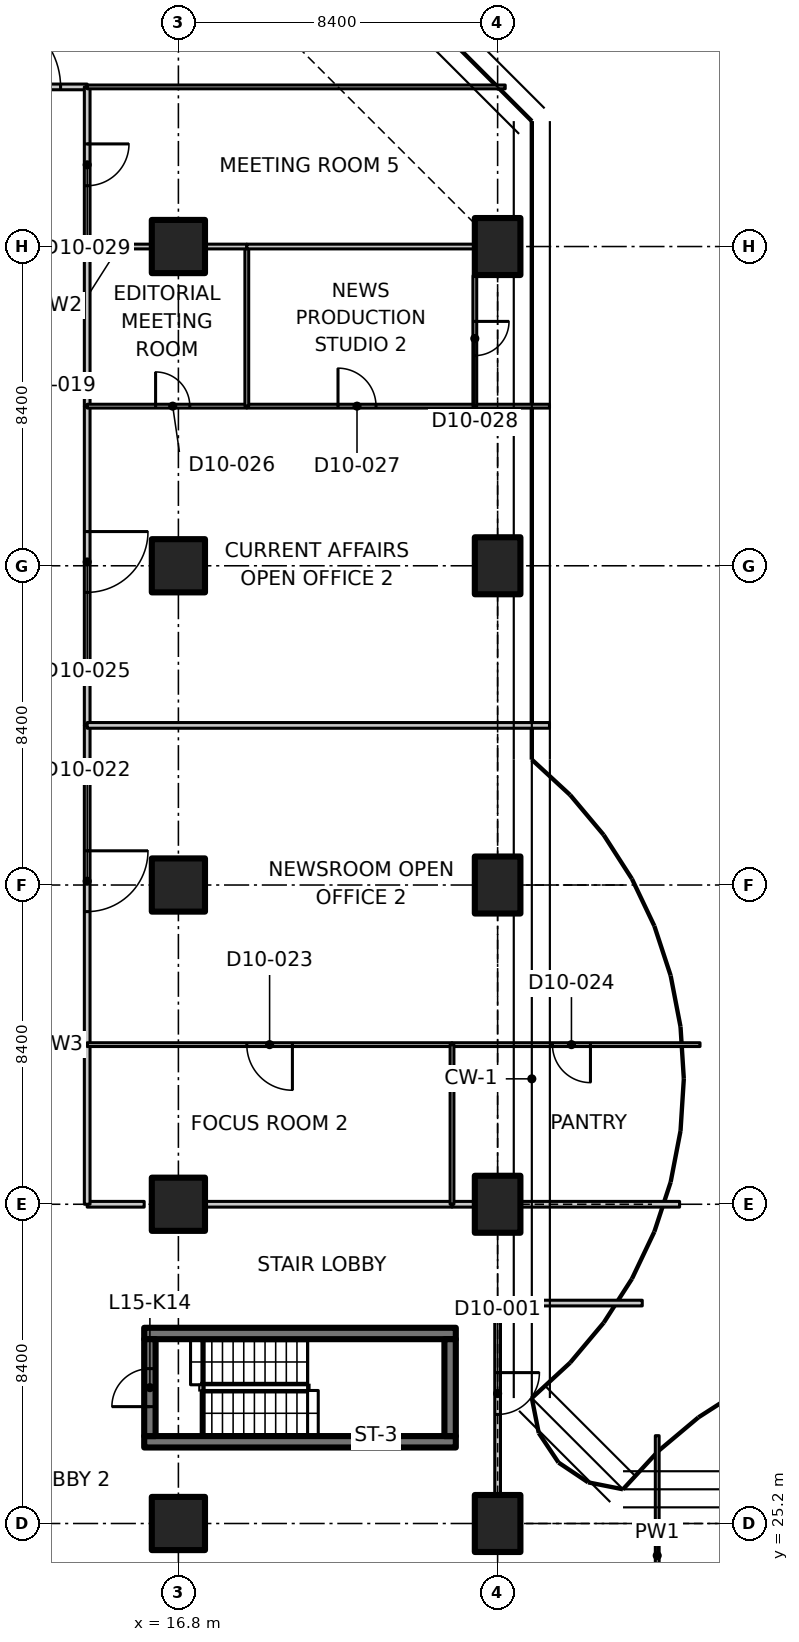
"""IFC4 building model, lengths in metres.
Left out: names, types, materials, properties, quantities, classifications, styles, units other than length and angle.
Written with IfcOpenShell. Run it as: python <this file> out.ifc"""

import sys

from ifc_helpers import new_model, si_unit, direction, frame, frame_2d, origin, origin_2d, place, context, subcontext, project, spatial, polyline, rectangle, outline, extrude, element, fill, save


model = new_model("IFC4")
c1 = context("Model", 3, precision=1e-05, world=origin(), true_north=direction((0.0, 1.0)))
c2 = subcontext(c1, "Body", "Model", "MODEL_VIEW")
j1 = project(units=[si_unit("LENGTHUNIT", "METRE"), si_unit("PLANEANGLEUNIT", "RADIAN")], contexts=[c1])
p1 = place(None, origin())
s1 = spatial("IfcSite", under=j1, at=p1, CompositionType="ELEMENT")
p2 = place(p1, origin())
s2 = spatial("IfcBuilding", under=s1, at=p2, CompositionType="ELEMENT")
p3 = place(p2, frame((0.0, 0.0, 68.9)))
s3 = spatial("IfcBuildingStorey", under=s2, at=p3, CompositionType="ELEMENT", Elevation=68.9)
for number, where, z_axis, x_axis in (
    (1, (16.8, 25.2, 0.0), (0.0, 0.0, 1.0), (1.0, 0.0, 0.0)),
    (2, (16.8, 33.6, 0.0), (0.0, 0.0, 1.0), (1.0, 0.0, 0.0)),
    (3, (16.8, 42.0, 0.0), (0.0, 0.0, 1.0), (1.0, 0.0, 0.0)),
    (4, (16.8, 50.4, 0.0), (0.0, 0.0, 1.0), (1.0, 0.0, 0.0)),
    (5, (16.8, 58.8, 0.0), (0.0, 0.0, 1.0), (1.0, 0.0, 0.0)),
):
    element("IfcColumn", number, at=place(p3, frame(where, z_axis=z_axis, x_axis=x_axis)), inside=s3, PredefinedType="COLUMN", context=c2, shape_type="SweptSolid", body=[
        extrude(rectangle(XDim=1.4, YDim=1.4, at=origin_2d()), origin(), (0.0, 0.0, 1.0), 3.35),
    ])
for number, where, z_axis, x_axis in (
    (6, (25.2, 25.2, 0.0), (0.0, 0.0, 1.0), (1.0, 0.0, 0.0)),
    (7, (25.2, 33.6, 0.0), (0.0, 0.0, 1.0), (1.0, 0.0, 0.0)),
    (8, (25.2, 42.0, 0.0), (0.0, 0.0, 1.0), (1.0, 0.0, 0.0)),
    (9, (25.2, 50.4, 0.0), (0.0, 0.0, 1.0), (1.0, 0.0, 0.0)),
    (10, (25.2, 58.8, 0.0), (0.0, 0.0, 1.0), (1.0, 0.0, 0.0)),
):
    element("IfcColumn", number, at=place(p3, frame(where, z_axis=z_axis, x_axis=x_axis)), inside=s3, PredefinedType="COLUMN", context=c2, shape_type="SweptSolid", body=[
        extrude(rectangle(XDim=1.2, YDim=1.5, at=origin_2d()), origin(), (0.0, 0.0, 1.0), 3.35),
    ])
for number, where, z_axis, x_axis in (
    (11, (15.9, 27.35, 0.0), (0.0, 0.0, 1.0), (1.0, 0.0, 0.0)),
    (12, (15.9, 30.2, 0.0), (0.0, 0.0, 1.0), (1.0, 0.0, 0.0)),
):
    element("IfcWall", number, at=place(p3, frame(where, z_axis=z_axis, x_axis=x_axis)), inside=s3, PredefinedType="SHEAR", context=c2, shape_type="SweptSolid", body=[
        extrude(rectangle(XDim=8.2, YDim=0.3, at=frame_2d((4.1, 0.0))), origin(), (0.0, 0.0, 1.0), 3.35),
    ])
p4 = place(p3, frame((16.05, 27.5, 0.0), z_axis=(0.0, 0.0, 1.0), x_axis=(0.0, 1.0, 0.0)))
e13 = element("IfcWall", 13, at=p4, inside=s3, PredefinedType="SHEAR", context=c2, shape_type="SweptSolid", body=[
    extrude(rectangle(XDim=2.55, YDim=0.3, at=frame_2d((1.275, 0.0))), origin(), (0.0, 0.0, 1.0), 3.35),
])
p5 = place(p4, frame((0.775, 0.0, 0.0)))
e14 = element("IfcOpeningElement", 14, at=p5, cuts=e13, PredefinedType="OPENING", context=c2, shape_type="SweptSolid", body=[
    extrude(rectangle(XDim=1.0, YDim=2.1, at=frame_2d((0.5, 1.05))), frame((0.0, 0.16, 0.0), z_axis=(0.0, -1.0, 0.0), x_axis=(1.0, 0.0, 0.0)), (0.0, 0.0, 1.0), 0.32),
])
p6 = place(p3, frame((23.95, 27.5, 0.0), z_axis=(0.0, 0.0, 1.0), x_axis=(0.0, 1.0, 0.0)))
e15 = element("IfcWall", 15, at=p6, inside=s3, PredefinedType="SHEAR", context=c2, shape_type="SweptSolid", body=[
    extrude(rectangle(XDim=2.55, YDim=0.3, at=frame_2d((1.275, 0.0))), origin(), (0.0, 0.0, 1.0), 3.35),
])
p7 = place(p3, frame((29.4, 27.511, 0.0), z_axis=(0.0, 0.0, 1.0), x_axis=(0.0, -1.0, 0.0)))
e16 = element("IfcWall", 16, at=p7, inside=s3, PredefinedType="PARTITIONING", context=c2, shape_type="SweptSolid", body=[
    extrude(outline(polyline([(0.0, 0.0), (6.311, 0.0), (6.311, 3.33), (2.761, 3.33), (2.759, 2.98), (1.863, 2.98), (1.861, 3.33), (0.236, 3.33), (0.0, 3.33), (0.0, 0.0)])), frame((0.0, 0.05, 0.0), z_axis=(0.0, -1.0, 0.0), x_axis=(1.0, 0.0, 0.0)), (0.0, 0.0, 1.0), 0.1),
])
p8 = place(p3, frame((25.2, 31.0, 0.0), z_axis=(0.0, 0.0, 1.0), x_axis=(0.0, -1.0, 0.0)))
e17 = element("IfcWall", 17, at=p8, inside=s3, PredefinedType="PARTITIONING", context=c2, shape_type="SweptSolid", body=[
    extrude(outline(polyline([(0.0, 0.0), (5.03, 0.0), (5.03, 2.98), (0.0, 2.98), (0.0, 0.0)])), frame((0.0, 0.075, 0.0), z_axis=(0.0, -1.0, 0.0), x_axis=(1.0, 0.0, 0.0)), (0.0, 0.0, 1.0), 0.15),
])
p9 = place(p8, frame((1.83, 0.0, 0.0)))
e18 = element("IfcOpeningElement", 18, at=p9, cuts=e17, PredefinedType="OPENING", context=c2, shape_type="SweptSolid", body=[
    extrude(rectangle(XDim=1.1, YDim=2.1, at=frame_2d((0.55, 1.05))), frame((0.0, 0.085, 0.0), z_axis=(0.0, -1.0, 0.0), x_axis=(1.0, 0.0, 0.0)), (0.0, 0.0, 1.0), 0.17),
])
p10 = place(p3, frame((25.2, 31.0, 0.0), z_axis=(0.0, 0.0, 1.0), x_axis=(1.0, 0.0, 0.0)))
e19 = element("IfcWall", 19, at=p10, inside=s3, PredefinedType="PARTITIONING", context=c2, shape_type="SweptSolid", body=[
    extrude(rectangle(XDim=3.806, YDim=0.15, at=frame_2d((1.903, 0.0))), origin(), (0.0, 0.0, 1.0), 2.98),
])
p11 = place(p3, frame((14.4, 33.6, 0.0), z_axis=(0.0, 0.0, 1.0), x_axis=(1.0, 0.0, 0.0)))
e20 = element("IfcWall", 20, at=p11, inside=s3, PredefinedType="PARTITIONING", context=c2, shape_type="SweptSolid", body=[
    extrude(rectangle(XDim=1.5, YDim=0.15, at=frame_2d((0.75, 0.0))), origin(), (0.0, 0.0, 1.0), 3.33),
])
p12 = place(p3, frame((17.52, 33.6, 0.0), z_axis=(0.0, 0.0, 1.0), x_axis=(1.0, 0.0, 0.0)))
e21 = element("IfcWall", 21, at=p12, inside=s3, PredefinedType="PARTITIONING", context=c2, shape_type="SweptSolid", body=[
    extrude(rectangle(XDim=6.48, YDim=0.15, at=frame_2d((3.24, 0.0))), origin(), (0.0, 0.0, 1.0), 3.33),
])
p13 = place(p3, frame((24.0, 33.6, 0.0), z_axis=(0.0, 0.0, 1.0), x_axis=(1.0, 0.0, 0.0)))
e22 = element("IfcWall", 22, at=p13, inside=s3, PredefinedType="PARTITIONING", context=c2, shape_type="SweptSolid", body=[
    extrude(rectangle(XDim=0.58, YDim=0.15, at=frame_2d((0.29, 0.0))), origin(), (0.0, 0.0, 1.0), 3.33),
])
p14 = place(p3, frame((25.82, 33.6, 0.0), z_axis=(0.0, 0.0, 1.0), x_axis=(1.0, 0.0, 0.0)))
e23 = element("IfcWall", 23, at=p14, inside=s3, PredefinedType="PARTITIONING", context=c2, shape_type="SweptSolid", body=[
    extrude(rectangle(XDim=4.168, YDim=0.15, at=frame_2d((2.084, 0.0))), origin(), (0.0, 0.0, 1.0), 2.98),
])
p15 = place(p3, frame((10.8, 63.0, 0.0), z_axis=(0.0, 0.0, 1.0), x_axis=(1.0, 0.0, 0.0)))
e24 = element("IfcWall", 24, at=p15, inside=s3, PredefinedType="PARTITIONING", context=c2, shape_type="SweptSolid", body=[
    extrude(rectangle(XDim=3.6, YDim=0.15, at=frame_2d((1.8, 0.0))), origin(), (0.0, 0.0, 1.0), 3.33),
])
p16 = place(p15, frame((0.9, 0.0, 0.0)))
e25 = element("IfcOpeningElement", 25, at=p16, cuts=e24, PredefinedType="OPENING", context=c2, shape_type="SweptSolid", body=[
    extrude(rectangle(XDim=2.0, YDim=2.4, at=frame_2d((1.0, 1.2))), frame((0.0, 0.085, 0.0), z_axis=(0.0, -1.0, 0.0), x_axis=(1.0, 0.0, 0.0)), (0.0, 0.0, 1.0), 0.17),
])
p17 = place(p3, frame((14.4, 46.2, 0.0), z_axis=(0.0, 0.0, 1.0), x_axis=(0.0, -1.0, 0.0)))
e26 = element("IfcWall", 26, at=p17, inside=s3, PredefinedType="PARTITIONING", context=c2, shape_type="SweptSolid", body=[
    extrude(rectangle(XDim=8.4, YDim=0.15, at=frame_2d((4.2, 0.0))), origin(), (0.0, 0.0, 1.0), 3.33),
])
p18 = place(p17, frame((3.3, 0.0, 0.0)))
e27 = element("IfcOpeningElement", 27, at=p18, cuts=e26, PredefinedType="OPENING", context=c2, shape_type="SweptSolid", body=[
    extrude(rectangle(XDim=1.6, YDim=2.1, at=frame_2d((0.8, 1.05))), frame((0.0, 0.085, 0.0), z_axis=(0.0, -1.0, 0.0), x_axis=(1.0, 0.0, 0.0)), (0.0, 0.0, 1.0), 0.17),
])
p19 = place(p3, frame((14.4, 37.8, 0.0), z_axis=(0.0, 0.0, 1.0), x_axis=(0.0, -1.0, 0.0)))
e28 = element("IfcWall", 28, at=p19, inside=s3, PredefinedType="PARTITIONING", context=c2, shape_type="SweptSolid", body=[
    extrude(rectangle(XDim=4.2, YDim=0.15, at=frame_2d((2.1, 0.0))), origin(), (0.0, 0.0, 1.0), 3.33),
])
p20 = place(p3, frame((14.4, 54.6, 0.0), z_axis=(0.0, 0.0, 1.0), x_axis=(0.0, -1.0, 0.0)))
e29 = element("IfcWall", 29, at=p20, inside=s3, PredefinedType="PARTITIONING", context=c2, shape_type="SweptSolid", body=[
    extrude(rectangle(XDim=8.4, YDim=0.15, at=frame_2d((4.2, 0.0))), origin(), (0.0, 0.0, 1.0), 3.33),
])
p21 = place(p20, frame((3.3, 0.0, 0.0)))
e30 = element("IfcOpeningElement", 30, at=p21, cuts=e29, PredefinedType="OPENING", context=c2, shape_type="SweptSolid", body=[
    extrude(rectangle(XDim=1.6, YDim=2.1, at=frame_2d((0.8, 1.05))), frame((0.0, 0.085, 0.0), z_axis=(0.0, -1.0, 0.0), x_axis=(1.0, 0.0, 0.0)), (0.0, 0.0, 1.0), 0.17),
])
p22 = place(p3, frame((14.4, 58.8, 0.0), z_axis=(0.0, 0.0, 1.0), x_axis=(0.0, -1.0, 0.0)))
e31 = element("IfcWall", 31, at=p22, inside=s3, PredefinedType="PARTITIONING", context=c2, shape_type="SweptSolid", body=[
    extrude(rectangle(XDim=4.2, YDim=0.15, at=frame_2d((2.1, 0.0))), origin(), (0.0, 0.0, 1.0), 3.33),
])
p23 = place(p3, frame((14.4, 63.0, 0.0), z_axis=(0.0, 0.0, 1.0), x_axis=(0.0, -1.0, 0.0)))
e32 = element("IfcWall", 32, at=p23, inside=s3, PredefinedType="PARTITIONING", context=c2, shape_type="SweptSolid", body=[
    extrude(rectangle(XDim=4.2, YDim=0.15, at=frame_2d((2.1, 0.0))), origin(), (0.0, 0.0, 1.0), 3.33),
])
p24 = place(p23, frame((1.5, 0.0, 0.0)))
e33 = element("IfcOpeningElement", 33, at=p24, cuts=e32, PredefinedType="OPENING", context=c2, shape_type="SweptSolid", body=[
    extrude(rectangle(XDim=1.1, YDim=2.1, at=frame_2d((0.55, 1.05))), frame((0.0, 0.085, 0.0), z_axis=(0.0, -1.0, 0.0), x_axis=(1.0, 0.0, 0.0)), (0.0, 0.0, 1.0), 0.17),
])
p25 = place(p3, frame((25.4, 63.0, 0.0), z_axis=(0.0, 0.0, 1.0), x_axis=(-1.0, 0.0, 0.0)))
e34 = element("IfcWall", 34, at=p25, inside=s3, PredefinedType="PARTITIONING", context=c2, shape_type="SweptSolid", body=[
    extrude(outline(polyline([(0.0, 0.0), (11.0, 0.0), (11.0, 3.33), (5.066, 3.33), (5.064, 2.98), (3.736, 2.98), (3.734, 3.33), (0.0, 3.33), (0.0, 0.0)])), frame((0.0, 0.05, 0.0), z_axis=(0.0, -1.0, 0.0), x_axis=(1.0, 0.0, 0.0)), (0.0, 0.0, 1.0), 0.1),
])
p26 = place(p3, frame((24.0, 37.8, 0.0), z_axis=(0.0, 0.0, 1.0), x_axis=(-1.0, 0.0, 0.0)))
e35 = element("IfcWall", 35, at=p26, inside=s3, PredefinedType="PARTITIONING", context=c2, shape_type="SweptSolid", body=[
    extrude(rectangle(XDim=9.6, YDim=0.1, at=frame_2d((4.8, 0.0))), origin(), (0.0, 0.0, 1.0), 3.33),
])
p27 = place(p26, frame((4.2, 0.0, 0.0)))
e36 = element("IfcOpeningElement", 36, at=p27, cuts=e35, PredefinedType="OPENING", context=c2, shape_type="SweptSolid", body=[
    extrude(rectangle(XDim=1.2, YDim=2.1, at=frame_2d((0.6, 1.05))), frame((0.0, 0.06, 0.0), z_axis=(0.0, -1.0, 0.0), x_axis=(1.0, 0.0, 0.0)), (0.0, 0.0, 1.0), 0.12),
])
p28 = place(p3, frame((30.526, 37.8, 0.0), z_axis=(0.0, 0.0, 1.0), x_axis=(-1.0, 0.0, 0.0)))
e37 = element("IfcWall", 37, at=p28, inside=s3, PredefinedType="PARTITIONING", context=c2, shape_type="SweptSolid", body=[
    extrude(outline(polyline([(0.0, 0.0), (6.526, 0.0), (6.526, 3.33), (5.776, 3.33), (5.774, 2.98), (4.878, 2.98), (4.876, 3.33), (0.283, 3.33), (0.0, 3.33), (0.0, 0.0)])), frame((0.0, 0.05, 0.0), z_axis=(0.0, -1.0, 0.0), x_axis=(1.0, 0.0, 0.0)), (0.0, 0.0, 1.0), 0.1),
])
p29 = place(p28, frame((2.883, 0.0, 0.0)))
e38 = element("IfcOpeningElement", 38, at=p29, cuts=e37, PredefinedType="OPENING", context=c2, shape_type="SweptSolid", body=[
    extrude(rectangle(XDim=1.0, YDim=2.1, at=frame_2d((0.5, 1.05))), frame((0.0, 0.06, 0.0), z_axis=(0.0, -1.0, 0.0), x_axis=(1.0, 0.0, 0.0)), (0.0, 0.0, 1.0), 0.12),
])
p30 = place(p3, frame((14.4, 46.2, 0.0), z_axis=(0.0, 0.0, 1.0), x_axis=(1.0, 0.0, 0.0)))
e39 = element("IfcWall", 39, at=p30, inside=s3, PredefinedType="PARTITIONING", context=c2, shape_type="SweptSolid", body=[
    extrude(outline(polyline([(0.0, 0.0), (12.165, 0.0), (12.165, 3.33), (11.9, 3.33), (11.25, 3.33), (11.248, 2.98), (10.352, 2.98), (10.35, 3.33), (0.0, 3.33), (0.0, 0.0)])), frame((0.0, 0.075, 0.0), z_axis=(0.0, -1.0, 0.0), x_axis=(1.0, 0.0, 0.0)), (0.0, 0.0, 1.0), 0.15),
])
p31 = place(p3, frame((24.0, 37.8, 0.0), z_axis=(0.0, 0.0, 1.0), x_axis=(0.0, -1.0, 0.0)))
e40 = element("IfcWall", 40, at=p31, inside=s3, PredefinedType="PARTITIONING", context=c2, shape_type="SweptSolid", body=[
    extrude(rectangle(XDim=4.2, YDim=0.1, at=frame_2d((2.1, 0.0))), origin(), (0.0, 0.0, 1.0), 3.33),
])
p32 = place(p3, frame((14.4, 54.6, 0.0), z_axis=(0.0, 0.0, 1.0), x_axis=(1.0, 0.0, 0.0)))
e41 = element("IfcWall", 41, at=p32, inside=s3, PredefinedType="PARTITIONING", context=c2, shape_type="SweptSolid", body=[
    extrude(rectangle(XDim=4.2, YDim=0.1, at=frame_2d((2.1, 0.0))), origin(), (0.0, 0.0, 1.0), 3.33),
])
p33 = place(p32, frame((1.8, 0.0, 0.0)))
e42 = element("IfcOpeningElement", 42, at=p33, cuts=e41, PredefinedType="OPENING", context=c2, shape_type="SweptSolid", body=[
    extrude(rectangle(XDim=0.9, YDim=2.1, at=frame_2d((0.45, 1.05))), frame((0.0, 0.06, 0.0), z_axis=(0.0, -1.0, 0.0), x_axis=(1.0, 0.0, 0.0)), (0.0, 0.0, 1.0), 0.12),
])
p34 = place(p3, frame((18.6, 54.6, 0.0), z_axis=(0.0, 0.0, 1.0), x_axis=(1.0, 0.0, 0.0)))
e43 = element("IfcWall", 43, at=p34, inside=s3, PredefinedType="PARTITIONING", context=c2, shape_type="SweptSolid", body=[
    extrude(rectangle(XDim=6.0, YDim=0.1, at=frame_2d((3.0, 0.0))), origin(), (0.0, 0.0, 1.0), 3.33),
])
p35 = place(p34, frame((2.4, 0.0, 0.0)))
e44 = element("IfcOpeningElement", 44, at=p35, cuts=e43, PredefinedType="OPENING", context=c2, shape_type="SweptSolid", body=[
    extrude(rectangle(XDim=1.0, YDim=2.1, at=frame_2d((0.5, 1.05))), frame((0.0, 0.06, 0.0), z_axis=(0.0, -1.0, 0.0), x_axis=(1.0, 0.0, 0.0)), (0.0, 0.0, 1.0), 0.12),
])
p36 = place(p3, frame((24.6, 54.6, 0.0), z_axis=(0.0, 0.0, 1.0), x_axis=(1.0, 0.0, 0.0)))
e45 = element("IfcWall", 45, at=p36, inside=s3, PredefinedType="PARTITIONING", context=c2, shape_type="SweptSolid", body=[
    extrude(rectangle(XDim=1.965, YDim=0.1, at=frame_2d((0.982, 0.0))), origin(), (0.0, 0.0, 1.0), 2.98),
])
p37 = place(p3, frame((18.6, 58.8, 0.0), z_axis=(0.0, 0.0, 1.0), x_axis=(0.0, -1.0, 0.0)))
e46 = element("IfcWall", 46, at=p37, inside=s3, PredefinedType="PARTITIONING", context=c2, shape_type="SweptSolid", body=[
    extrude(rectangle(XDim=4.2, YDim=0.1, at=frame_2d((2.1, 0.0))), origin(), (0.0, 0.0, 1.0), 3.33),
])
p38 = place(p3, frame((14.4, 58.8, 0.0), z_axis=(0.0, 0.0, 1.0), x_axis=(1.0, 0.0, 0.0)))
e47 = element("IfcWall", 47, at=p38, inside=s3, PredefinedType="PARTITIONING", context=c2, shape_type="SweptSolid", body=[
    extrude(rectangle(XDim=1.68, YDim=0.125, at=frame_2d((0.84, 0.0))), origin(), (0.0, 0.0, 1.0), 3.33),
])
p39 = place(p3, frame((17.52, 58.8, 0.0), z_axis=(0.0, 0.0, 1.0), x_axis=(1.0, 0.0, 0.0)))
e48 = element("IfcWall", 48, at=p39, inside=s3, PredefinedType="PARTITIONING", context=c2, shape_type="SweptSolid", body=[
    extrude(rectangle(XDim=1.08, YDim=0.125, at=frame_2d((0.54, 0.0))), origin(), (0.0, 0.0, 1.0), 3.33),
])
p40 = place(p3, frame((24.6, 58.03, 0.0), z_axis=(0.0, 0.0, 1.0), x_axis=(0.0, -1.0, 0.0)))
e49 = element("IfcWall", 49, at=p40, inside=s3, PredefinedType="PARTITIONING", context=c2, shape_type="SweptSolid", body=[
    extrude(rectangle(XDim=3.43, YDim=0.1, at=frame_2d((1.715, 0.0))), origin(), (0.0, 0.0, 1.0), 3.33),
])
p41 = place(p40, frame((1.2, 0.0, 0.0)))
e50 = element("IfcOpeningElement", 50, at=p41, cuts=e49, PredefinedType="OPENING", context=c2, shape_type="SweptSolid", body=[
    extrude(rectangle(XDim=0.9, YDim=2.1, at=frame_2d((0.45, 1.05))), frame((0.0, 0.06, 0.0), z_axis=(0.0, -1.0, 0.0), x_axis=(1.0, 0.0, 0.0)), (0.0, 0.0, 1.0), 0.12),
])
p42 = place(p3, frame((18.6, 58.8, 0.0), z_axis=(0.0, 0.0, 1.0), x_axis=(1.0, 0.0, 0.0)))
e51 = element("IfcWall", 51, at=p42, inside=s3, PredefinedType="PARTITIONING", context=c2, shape_type="SweptSolid", body=[
    extrude(rectangle(XDim=5.98, YDim=0.125, at=frame_2d((2.99, 0.0))), origin(), (0.0, 0.0, 1.0), 3.33),
])
p43 = place(p5, origin())
e52 = element("IfcDoor", 52, at=p43, inside=s3, OperationType="SINGLE_SWING_RIGHT", PredefinedType="DOOR", context=c2, shape_type="SweptSolid", body=[
    extrude(rectangle(XDim=1.0, YDim=2.1, at=frame_2d((0.5, 1.05))), frame((0.0, 0.025, 0.0), z_axis=(0.0, -1.0, 0.0), x_axis=(1.0, 0.0, 0.0)), (0.0, 0.0, 1.0), 0.05),
])
fill(e14, e52)
p44 = place(p9, origin())
e53 = element("IfcDoor", 53, at=p44, inside=s3, OperationType="SINGLE_SWING_RIGHT", PredefinedType="DOOR", context=c2, shape_type="SweptSolid", body=[
    extrude(rectangle(XDim=1.1, YDim=2.1, at=frame_2d((0.55, 1.05))), frame((0.0, 0.025, 0.0), z_axis=(0.0, -1.0, 0.0), x_axis=(1.0, 0.0, 0.0)), (0.0, 0.0, 1.0), 0.05),
])
fill(e18, e53)
p45 = place(p16, origin())
e54 = element("IfcDoor", 54, at=p45, inside=s3, OperationType="DOUBLE_DOOR_SINGLE_SWING", PredefinedType="DOOR", context=c2, shape_type="SweptSolid", body=[
    extrude(rectangle(XDim=2.0, YDim=2.4, at=frame_2d((1.0, 1.2))), frame((0.0, 0.025, 0.0), z_axis=(0.0, -1.0, 0.0), x_axis=(1.0, 0.0, 0.0)), (0.0, 0.0, 1.0), 0.05),
])
fill(e25, e54)
p46 = place(p18, origin())
e55 = element("IfcDoor", 55, at=p46, inside=s3, OperationType="DOUBLE_DOOR_SINGLE_SWING", PredefinedType="DOOR", context=c2, shape_type="SweptSolid", body=[
    extrude(rectangle(XDim=1.6, YDim=2.1, at=frame_2d((0.8, 1.05))), frame((0.0, 0.025, 0.0), z_axis=(0.0, -1.0, 0.0), x_axis=(1.0, 0.0, 0.0)), (0.0, 0.0, 1.0), 0.05),
])
fill(e27, e55)
p47 = place(p27, origin())
e56 = element("IfcDoor", 56, at=p47, inside=s3, OperationType="SINGLE_SWING_LEFT", PredefinedType="DOOR", context=c2, shape_type="SweptSolid", body=[
    extrude(rectangle(XDim=1.2, YDim=2.1, at=frame_2d((0.6, 1.05))), frame((0.0, 0.025, 0.0), z_axis=(0.0, -1.0, 0.0), x_axis=(1.0, 0.0, 0.0)), (0.0, 0.0, 1.0), 0.05),
])
fill(e36, e56)
p48 = place(p29, origin())
e57 = element("IfcDoor", 57, at=p48, inside=s3, OperationType="SINGLE_SWING_LEFT", PredefinedType="DOOR", context=c2, shape_type="SweptSolid", body=[
    extrude(rectangle(XDim=1.0, YDim=2.1, at=frame_2d((0.5, 1.05))), frame((0.0, 0.025, 0.0), z_axis=(0.0, -1.0, 0.0), x_axis=(1.0, 0.0, 0.0)), (0.0, 0.0, 1.0), 0.05),
])
fill(e38, e57)
p49 = place(p21, origin())
e58 = element("IfcDoor", 58, at=p49, inside=s3, OperationType="DOUBLE_DOOR_SINGLE_SWING", PredefinedType="DOOR", context=c2, shape_type="SweptSolid", body=[
    extrude(rectangle(XDim=1.6, YDim=2.1, at=frame_2d((0.8, 1.05))), frame((0.0, 0.025, 0.0), z_axis=(0.0, -1.0, 0.0), x_axis=(1.0, 0.0, 0.0)), (0.0, 0.0, 1.0), 0.05),
])
fill(e30, e58)
p50 = place(p33, origin())
e59 = element("IfcDoor", 59, at=p50, inside=s3, OperationType="SINGLE_SWING_LEFT", PredefinedType="DOOR", context=c2, shape_type="SweptSolid", body=[
    extrude(rectangle(XDim=0.9, YDim=2.1, at=frame_2d((0.45, 1.05))), frame((0.0, 0.025, 0.0), z_axis=(0.0, -1.0, 0.0), x_axis=(1.0, 0.0, 0.0)), (0.0, 0.0, 1.0), 0.05),
])
fill(e42, e59)
p51 = place(p35, origin())
e60 = element("IfcDoor", 60, at=p51, inside=s3, OperationType="SINGLE_SWING_LEFT", PredefinedType="DOOR", context=c2, shape_type="SweptSolid", body=[
    extrude(rectangle(XDim=1.0, YDim=2.1, at=frame_2d((0.5, 1.05))), frame((0.0, 0.025, 0.0), z_axis=(0.0, -1.0, 0.0), x_axis=(1.0, 0.0, 0.0)), (0.0, 0.0, 1.0), 0.05),
])
fill(e44, e60)
p52 = place(p41, origin())
e61 = element("IfcDoor", 61, at=p52, inside=s3, OperationType="SINGLE_SWING_LEFT", PredefinedType="DOOR", context=c2, shape_type="SweptSolid", body=[
    extrude(rectangle(XDim=0.9, YDim=2.1, at=frame_2d((0.45, 1.05))), frame((0.0, 0.025, 0.0), z_axis=(0.0, -1.0, 0.0), x_axis=(1.0, 0.0, 0.0)), (0.0, 0.0, 1.0), 0.05),
])
fill(e50, e61)
p53 = place(p24, origin())
e62 = element("IfcDoor", 62, at=p53, inside=s3, OperationType="SINGLE_SWING_LEFT", PredefinedType="DOOR", context=c2, shape_type="SweptSolid", body=[
    extrude(rectangle(XDim=1.1, YDim=2.1, at=frame_2d((0.55, 1.05))), frame((0.0, 0.025, 0.0), z_axis=(0.0, -1.0, 0.0), x_axis=(1.0, 0.0, 0.0)), (0.0, 0.0, 1.0), 0.05),
])
fill(e33, e62)
save(model, sys.argv[1])
